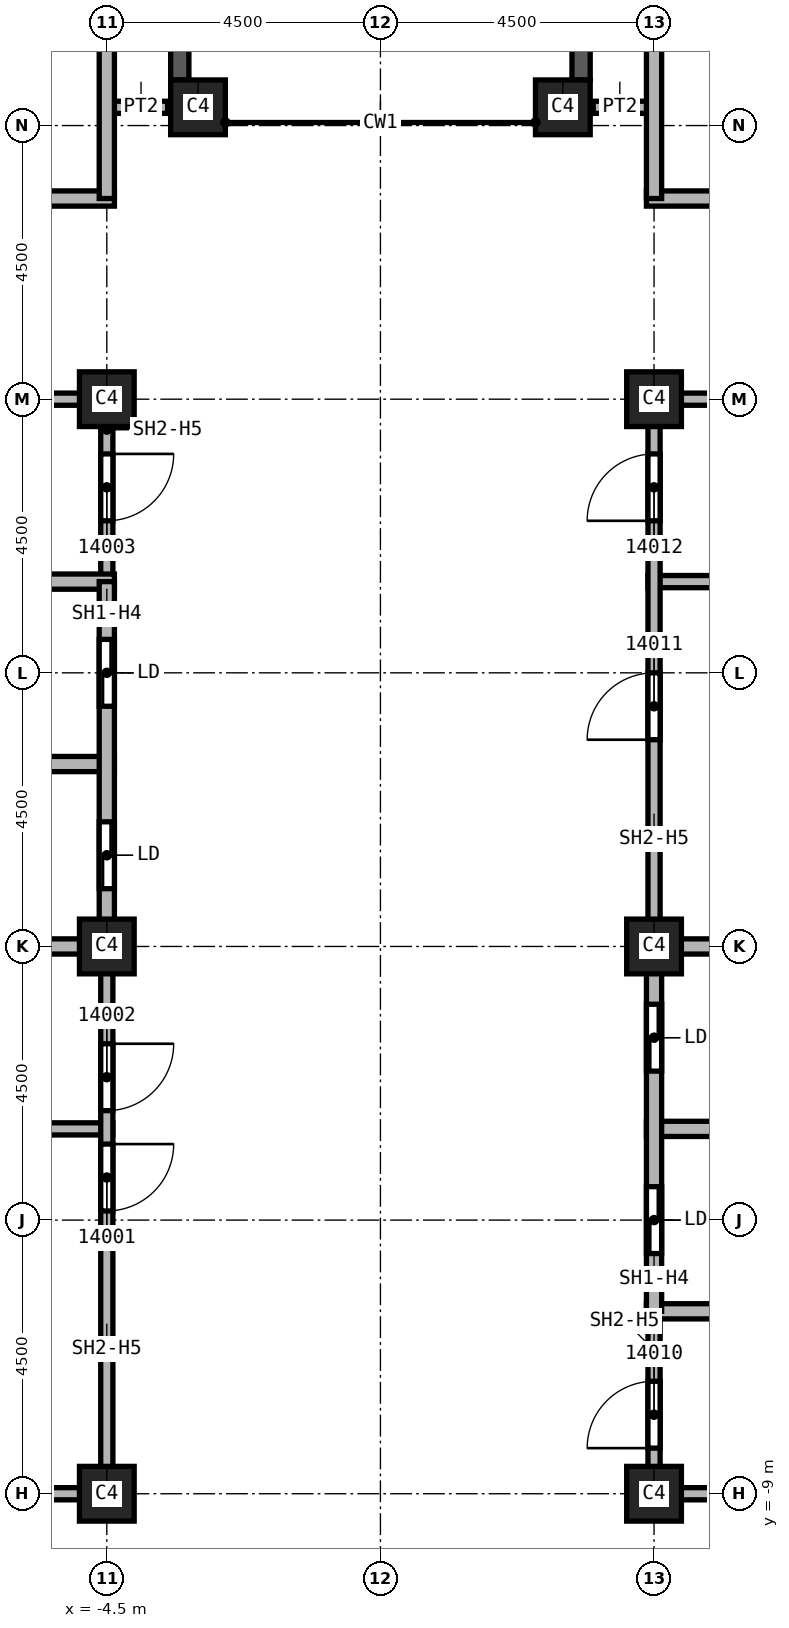
"""IFC4 building model, lengths in metres.
Left out: names, types, materials, properties, quantities, classifications, styles, units other than length and angle.
Written with IfcOpenShell. Run it as: python <this file> out.ifc"""

import sys

from ifc_helpers import new_model, si_unit, direction, frame, frame_2d, origin, origin_2d, place, context, subcontext, project, spatial, rectangle, extrude, element, fill, save


model = new_model("IFC4")
c1 = context("Model", 3, precision=1e-05, world=origin(), true_north=direction((0.0, 1.0)))
c2 = subcontext(c1, "Body", "Model", "MODEL_VIEW")
j1 = project(units=[si_unit("LENGTHUNIT", "METRE"), si_unit("PLANEANGLEUNIT", "RADIAN")], contexts=[c1])
p1 = place(None, origin())
s1 = spatial("IfcSite", under=j1, at=p1, CompositionType="ELEMENT")
p2 = place(p1, origin())
s2 = spatial("IfcBuilding", under=s1, at=p2, CompositionType="ELEMENT")
p3 = place(p2, frame((0.0, 0.0, 220.0)))
s3 = spatial("IfcBuildingStorey", under=s2, at=p3, CompositionType="ELEMENT", Elevation=220.0)
for number, where, z_axis, x_axis in (
    (1, (4.5, 0.0, 0.0), (0.0, 0.0, 1.0), (1.0, 0.0, 0.0)),
    (2, (4.5, 9.0, 0.0), (0.0, 0.0, 1.0), (1.0, 0.0, 0.0)),
    (3, (4.5, -9.0, 0.0), (0.0, 0.0, 1.0), (1.0, 0.0, 0.0)),
    (4, (-4.5, 0.0, 0.0), (0.0, 0.0, 1.0), (1.0, 0.0, 0.0)),
    (5, (-4.5, 9.0, 0.0), (0.0, 0.0, 1.0), (1.0, 0.0, 0.0)),
    (6, (-4.5, -9.0, 0.0), (0.0, 0.0, 1.0), (1.0, 0.0, 0.0)),
    (7, (3.0, 13.8, 0.0), (0.0, 0.0, 1.0), (1.0, 0.0, 0.0)),
    (8, (-3.0, 13.8, 0.0), (0.0, 0.0, 1.0), (1.0, 0.0, 0.0)),
):
    element("IfcColumn", number, at=place(p3, frame(where, z_axis=z_axis, x_axis=x_axis)), inside=s3, PredefinedType="COLUMN", context=c2, shape_type="SweptSolid", body=[
        extrude(rectangle(XDim=0.9, YDim=0.9, at=origin_2d()), origin(), (0.0, 0.0, 1.0), 3.72),
    ])
p4 = place(p3, frame((3.3, 22.3, 0.0), z_axis=(0.0, 0.0, 1.0), x_axis=(0.0, -1.0, 0.0)))
e9 = element("IfcWall", 9, at=p4, inside=s3, PredefinedType="SOLIDWALL", context=c2, shape_type="SweptSolid", body=[
    extrude(rectangle(XDim=8.05, YDim=0.3, at=frame_2d((4.025, 0.0))), origin(), (0.0, 0.0, 1.0), 3.12),
])
p5 = place(p4, frame((0.812, 0.0, 0.8)))
e10 = element("IfcOpeningElement", 10, at=p5, cuts=e9, PredefinedType="OPENING", context=c2, shape_type="SweptSolid", body=[
    extrude(rectangle(XDim=2.4, YDim=1.95, at=frame_2d((1.2, 0.975))), frame((0.0, 0.15, 0.0), z_axis=(0.0, -1.0, 0.0), x_axis=(1.0, 0.0, 0.0)), (0.0, 0.0, 1.0), 0.3),
])
p6 = place(p4, frame((4.837, 0.0, 0.8)))
e11 = element("IfcOpeningElement", 11, at=p6, cuts=e9, PredefinedType="OPENING", context=c2, shape_type="SweptSolid", body=[
    extrude(rectangle(XDim=2.4, YDim=1.95, at=frame_2d((1.2, 0.975))), frame((0.0, 0.15, 0.0), z_axis=(0.0, -1.0, 0.0), x_axis=(1.0, 0.0, 0.0)), (0.0, 0.0, 1.0), 0.3),
])
p7 = place(p3, frame((-3.3, 14.25, 0.0), z_axis=(0.0, 0.0, 1.0), x_axis=(0.0, 1.0, 0.0)))
e12 = element("IfcWall", 12, at=p7, inside=s3, PredefinedType="SOLIDWALL", context=c2, shape_type="SweptSolid", body=[
    extrude(rectangle(XDim=8.05, YDim=0.3, at=frame_2d((4.025, 0.0))), origin(), (0.0, 0.0, 1.0), 3.12),
])
p8 = place(p7, frame((0.812, 0.0, 0.8)))
e13 = element("IfcOpeningElement", 13, at=p8, cuts=e12, PredefinedType="OPENING", context=c2, shape_type="SweptSolid", body=[
    extrude(rectangle(XDim=2.4, YDim=1.95, at=frame_2d((1.2, 0.975))), frame((0.0, 0.15, 0.0), z_axis=(0.0, -1.0, 0.0), x_axis=(1.0, 0.0, 0.0)), (0.0, 0.0, 1.0), 0.3),
])
p9 = place(p7, frame((4.837, 0.0, 0.8)))
e14 = element("IfcOpeningElement", 14, at=p9, cuts=e12, PredefinedType="OPENING", context=c2, shape_type="SweptSolid", body=[
    extrude(rectangle(XDim=2.4, YDim=1.95, at=frame_2d((1.2, 0.975))), frame((0.0, 0.15, 0.0), z_axis=(0.0, -1.0, 0.0), x_axis=(1.0, 0.0, 0.0)), (0.0, 0.0, 1.0), 0.3),
])
for number, where, z_axis, x_axis in (
    (15, (-4.5, 13.8, 0.0), (0.0, 0.0, 1.0), (1.0, 0.0, 0.0)),
    (16, (3.5, 13.8, 0.0), (0.0, 0.0, 1.0), (1.0, 0.0, 0.0)),
):
    element("IfcWall", number, at=place(p3, frame(where, z_axis=z_axis, x_axis=x_axis)), inside=s3, PredefinedType="PARTITIONING", context=c2, shape_type="SweptSolid", body=[
        extrude(rectangle(XDim=1.0, YDim=0.2, at=frame_2d((0.5, 0.0))), origin(), (0.0, 0.0, 1.0), 3.72),
    ])
p10 = place(p3, frame((-7.625, -3.0, 0.0), z_axis=(0.0, 0.0, 1.0), x_axis=(1.0, 0.0, 0.0)))
e17 = element("IfcWall", 17, at=p10, inside=s3, PredefinedType="SOLIDWALL", context=c2, shape_type="SweptSolid", body=[
    extrude(rectangle(XDim=3.225, YDim=0.2, at=frame_2d((1.613, 0.0))), origin(), (0.0, 0.0, 1.0), 3.72),
])
for number, where, z_axis, x_axis in (
    (18, (-7.5, 9.0, 0.0), (0.0, 0.0, 1.0), (1.0, 0.0, 0.0)),
    (19, (-4.5, -9.0, 0.0), (0.0, 0.0, 1.0), (-1.0, 0.0, 0.0)),
):
    element("IfcWall", number, at=place(p3, frame(where, z_axis=z_axis, x_axis=x_axis)), inside=s3, PredefinedType="SOLIDWALL", context=c2, shape_type="SweptSolid", body=[
        extrude(rectangle(XDim=3.0, YDim=0.2, at=frame_2d((1.5, 0.0))), origin(), (0.0, 0.0, 1.0), 2.958),
    ])
p11 = place(p3, frame((-4.5, 0.0, 0.0), z_axis=(0.0, 0.0, 1.0), x_axis=(0.0, -1.0, 0.0)))
e20 = element("IfcWall", 20, at=p11, inside=s3, PredefinedType="SOLIDWALL", context=c2, shape_type="SweptSolid", body=[
    extrude(rectangle(XDim=9.1, YDim=0.2, at=frame_2d((4.55, 0.0))), origin(), (0.0, 0.0, 1.0), 2.958),
])
p12 = place(p11, frame((3.25, 0.0, 0.0)))
e21 = element("IfcOpeningElement", 21, at=p12, cuts=e20, PredefinedType="OPENING", context=c2, shape_type="SweptSolid", body=[
    extrude(rectangle(XDim=1.1, YDim=2.1, at=frame_2d((0.55, 1.05))), frame((0.0, 0.1, 0.0), z_axis=(0.0, -1.0, 0.0), x_axis=(1.0, 0.0, 0.0)), (0.0, 0.0, 1.0), 0.2),
])
p13 = place(p11, frame((1.6, 0.0, 0.0)))
e22 = element("IfcOpeningElement", 22, at=p13, cuts=e20, PredefinedType="OPENING", context=c2, shape_type="SweptSolid", body=[
    extrude(rectangle(XDim=1.1, YDim=2.1, at=frame_2d((0.55, 1.05))), frame((0.0, 0.1, 0.0), z_axis=(0.0, -1.0, 0.0), x_axis=(1.0, 0.0, 0.0)), (0.0, 0.0, 1.0), 0.2),
])
p14 = place(p3, frame((-4.5, 9.1, 0.0), z_axis=(0.0, 0.0, 1.0), x_axis=(0.0, -1.0, 0.0)))
e23 = element("IfcWall", 23, at=p14, inside=s3, PredefinedType="SOLIDWALL", context=c2, shape_type="SweptSolid", body=[
    extrude(rectangle(XDim=3.1, YDim=0.2, at=frame_2d((1.55, 0.0))), origin(), (0.0, 0.0, 1.0), 2.958),
])
p15 = place(p14, frame((1.0, 0.0, 0.0)))
e24 = element("IfcOpeningElement", 24, at=p15, cuts=e23, PredefinedType="OPENING", context=c2, shape_type="SweptSolid", body=[
    extrude(rectangle(XDim=1.1, YDim=2.1, at=frame_2d((0.55, 1.05))), frame((0.0, 0.1, 0.0), z_axis=(0.0, -1.0, 0.0), x_axis=(1.0, 0.0, 0.0)), (0.0, 0.0, 1.0), 0.2),
])
p16 = place(p3, frame((4.4, 6.0, 0.0), z_axis=(0.0, 0.0, 1.0), x_axis=(1.0, 0.0, 0.0)))
e25 = element("IfcWall", 25, at=p16, inside=s3, PredefinedType="SOLIDWALL", context=c2, shape_type="SweptSolid", body=[
    extrude(rectangle(XDim=3.2, YDim=0.2, at=frame_2d((1.6, 0.0))), origin(), (0.0, 0.0, 1.0), 3.72),
])
p17 = place(p3, frame((4.5, -9.1, 0.0), z_axis=(0.0, 0.0, 1.0), x_axis=(0.0, 1.0, 0.0)))
e26 = element("IfcWall", 26, at=p17, inside=s3, PredefinedType="SOLIDWALL", context=c2, shape_type="SweptSolid", body=[
    extrude(rectangle(XDim=3.1, YDim=0.2, at=frame_2d((1.55, 0.0))), origin(), (0.0, 0.0, 1.0), 2.958),
])
p18 = place(p17, frame((0.85, 0.0, 0.0)))
e27 = element("IfcOpeningElement", 27, at=p18, cuts=e26, PredefinedType="OPENING", context=c2, shape_type="SweptSolid", body=[
    extrude(rectangle(XDim=1.1, YDim=2.1, at=frame_2d((0.55, 1.05))), frame((0.0, 0.1, 0.0), z_axis=(0.0, -1.0, 0.0), x_axis=(1.0, 0.0, 0.0)), (0.0, 0.0, 1.0), 0.2),
])
p19 = place(p3, frame((4.5, 0.0, 0.0), z_axis=(0.0, 0.0, 1.0), x_axis=(0.0, 1.0, 0.0)))
e28 = element("IfcWall", 28, at=p19, inside=s3, PredefinedType="SOLIDWALL", context=c2, shape_type="SweptSolid", body=[
    extrude(rectangle(XDim=9.1, YDim=0.2, at=frame_2d((4.55, 0.0))), origin(), (0.0, 0.0, 1.0), 2.958),
])
p20 = place(p19, frame((3.4, 0.0, 0.0)))
e29 = element("IfcOpeningElement", 29, at=p20, cuts=e28, PredefinedType="OPENING", context=c2, shape_type="SweptSolid", body=[
    extrude(rectangle(XDim=1.1, YDim=2.1, at=frame_2d((0.55, 1.05))), frame((0.0, 0.1, 0.0), z_axis=(0.0, -1.0, 0.0), x_axis=(1.0, 0.0, 0.0)), (0.0, 0.0, 1.0), 0.2),
])
p21 = place(p19, frame((7.0, 0.0, 0.0)))
e30 = element("IfcOpeningElement", 30, at=p21, cuts=e28, PredefinedType="OPENING", context=c2, shape_type="SweptSolid", body=[
    extrude(rectangle(XDim=1.1, YDim=2.1, at=frame_2d((0.55, 1.05))), frame((0.0, 0.1, 0.0), z_axis=(0.0, -1.0, 0.0), x_axis=(1.0, 0.0, 0.0)), (0.0, 0.0, 1.0), 0.2),
])
for number, where, z_axis, x_axis in (
    (31, (4.5, 9.0, 0.0), (0.0, 0.0, 1.0), (1.0, 0.0, 0.0)),
    (32, (7.5, -9.0, 0.0), (0.0, 0.0, 1.0), (-1.0, 0.0, 0.0)),
):
    element("IfcWall", number, at=place(p3, frame(where, z_axis=z_axis, x_axis=x_axis)), inside=s3, PredefinedType="SOLIDWALL", context=c2, shape_type="SweptSolid", body=[
        extrude(rectangle(XDim=3.0, YDim=0.2, at=frame_2d((1.5, 0.0))), origin(), (0.0, 0.0, 1.0), 2.958),
    ])
p22 = place(p3, frame((-13.625, 3.0, 0.0), z_axis=(0.0, 0.0, 1.0), x_axis=(1.0, 0.0, 0.0)))
e33 = element("IfcWall", 33, at=p22, inside=s3, PredefinedType="SOLIDWALL", context=c2, shape_type="SweptSolid", body=[
    extrude(rectangle(XDim=9.25, YDim=0.25, at=frame_2d((4.625, 0.0))), origin(), (0.0, 0.0, 1.0), 3.72),
])
p23 = place(p22, frame((3.25, 0.0, 0.0)))
e34 = element("IfcOpeningElement", 34, at=p23, cuts=e33, PredefinedType="OPENING", context=c2, shape_type="SweptSolid", body=[
    extrude(rectangle(XDim=1.1, YDim=2.1, at=frame_2d((0.55, 1.05))), frame((0.0, 0.125, 0.0), z_axis=(0.0, -1.0, 0.0), x_axis=(1.0, 0.0, 0.0)), (0.0, 0.0, 1.0), 0.25),
])
for number, where, z_axis, x_axis in (
    (35, (-7.625, 0.0, 0.0), (0.0, 0.0, 1.0), (1.0, 0.0, 0.0)),
    (36, (-7.625, 6.0, 0.0), (0.0, 0.0, 1.0), (1.0, 0.0, 0.0)),
):
    element("IfcWall", number, at=place(p3, frame(where, z_axis=z_axis, x_axis=x_axis)), inside=s3, PredefinedType="SOLIDWALL", context=c2, shape_type="SweptSolid", body=[
        extrude(rectangle(XDim=3.25, YDim=0.25, at=frame_2d((1.625, 0.0))), origin(), (0.0, 0.0, 1.0), 3.72),
    ])
p24 = place(p3, frame((-4.5, 6.0, 0.0), z_axis=(0.0, 0.0, 1.0), x_axis=(0.0, -1.0, 0.0)))
e37 = element("IfcWall", 37, at=p24, inside=s3, PredefinedType="SOLIDWALL", context=c2, shape_type="SweptSolid", body=[
    extrude(rectangle(XDim=6.0, YDim=0.25, at=frame_2d((3.0, 0.0))), origin(), (0.0, 0.0, 1.0), 2.958),
])
p25 = place(p24, frame((3.95, 0.0, 0.0)))
e38 = element("IfcOpeningElement", 38, at=p25, cuts=e37, PredefinedType="OPENING", context=c2, shape_type="SweptSolid", body=[
    extrude(rectangle(XDim=1.1, YDim=2.1, at=frame_2d((0.55, 1.05))), frame((0.0, 0.125, 0.0), z_axis=(0.0, -1.0, 0.0), x_axis=(1.0, 0.0, 0.0)), (0.0, 0.0, 1.0), 0.25),
])
p26 = place(p24, frame((0.95, 0.0, 0.0)))
e39 = element("IfcOpeningElement", 39, at=p26, cuts=e37, PredefinedType="OPENING", context=c2, shape_type="SweptSolid", body=[
    extrude(rectangle(XDim=1.1, YDim=2.1, at=frame_2d((0.55, 1.05))), frame((0.0, 0.125, 0.0), z_axis=(0.0, -1.0, 0.0), x_axis=(1.0, 0.0, 0.0)), (0.0, 0.0, 1.0), 0.25),
])
p27 = place(p3, frame((4.375, -6.0, 0.0), z_axis=(0.0, 0.0, 1.0), x_axis=(1.0, 0.0, 0.0)))
e40 = element("IfcWall", 40, at=p27, inside=s3, PredefinedType="SOLIDWALL", context=c2, shape_type="SweptSolid", body=[
    extrude(rectangle(XDim=3.25, YDim=0.25, at=frame_2d((1.625, 0.0))), origin(), (0.0, 0.0, 1.0), 3.72),
])
p28 = place(p3, frame((4.375, -3.0, 0.0), z_axis=(0.0, 0.0, 1.0), x_axis=(1.0, 0.0, 0.0)))
e41 = element("IfcWall", 41, at=p28, inside=s3, PredefinedType="SOLIDWALL", context=c2, shape_type="SweptSolid", body=[
    extrude(rectangle(XDim=9.25, YDim=0.25, at=frame_2d((4.625, 0.0))), origin(), (0.0, 0.0, 1.0), 3.72),
])
p29 = place(p28, frame((3.375, 0.0, 0.0)))
e42 = element("IfcOpeningElement", 42, at=p29, cuts=e41, PredefinedType="OPENING", context=c2, shape_type="SweptSolid", body=[
    extrude(rectangle(XDim=1.1, YDim=2.1, at=frame_2d((0.55, 1.05))), frame((0.0, 0.125, 0.0), z_axis=(0.0, -1.0, 0.0), x_axis=(1.0, 0.0, 0.0)), (0.0, 0.0, 1.0), 0.25),
])
p30 = place(p3, frame((4.375, 0.0, 0.0), z_axis=(0.0, 0.0, 1.0), x_axis=(1.0, 0.0, 0.0)))
e43 = element("IfcWall", 43, at=p30, inside=s3, PredefinedType="SOLIDWALL", context=c2, shape_type="SweptSolid", body=[
    extrude(rectangle(XDim=3.25, YDim=0.25, at=frame_2d((1.625, 0.0))), origin(), (0.0, 0.0, 1.0), 3.72),
])
p31 = place(p3, frame((4.5, -6.0, 0.0), z_axis=(0.0, 0.0, 1.0), x_axis=(0.0, 1.0, 0.0)))
e44 = element("IfcWall", 44, at=p31, inside=s3, PredefinedType="SOLIDWALL", context=c2, shape_type="SweptSolid", body=[
    extrude(rectangle(XDim=6.0, YDim=0.25, at=frame_2d((3.0, 0.0))), origin(), (0.0, 0.0, 1.0), 2.958),
])
p32 = place(p31, frame((0.95, 0.0, 0.0)))
e45 = element("IfcOpeningElement", 45, at=p32, cuts=e44, PredefinedType="OPENING", context=c2, shape_type="SweptSolid", body=[
    extrude(rectangle(XDim=1.1, YDim=2.1, at=frame_2d((0.55, 1.05))), frame((0.0, 0.125, 0.0), z_axis=(0.0, -1.0, 0.0), x_axis=(1.0, 0.0, 0.0)), (0.0, 0.0, 1.0), 0.25),
])
p33 = place(p31, frame((3.95, 0.0, 0.0)))
e46 = element("IfcOpeningElement", 46, at=p33, cuts=e44, PredefinedType="OPENING", context=c2, shape_type="SweptSolid", body=[
    extrude(rectangle(XDim=1.1, YDim=2.1, at=frame_2d((0.55, 1.05))), frame((0.0, 0.125, 0.0), z_axis=(0.0, -1.0, 0.0), x_axis=(1.0, 0.0, 0.0)), (0.0, 0.0, 1.0), 0.25),
])
p34 = place(p3, frame((-13.625, 12.3, 0.0), z_axis=(0.0, 0.0, 1.0), x_axis=(1.0, 0.0, 0.0)))
e47 = element("IfcWall", 47, at=p34, inside=s3, PredefinedType="SOLIDWALL", context=c2, shape_type="SweptSolid", body=[
    extrude(rectangle(XDim=9.25, YDim=0.25, at=frame_2d((4.625, 0.0))), origin(), (0.0, 0.0, 1.0), 3.72),
])
p35 = place(p34, frame((0.85, 0.0, 0.0)))
e48 = element("IfcOpeningElement", 48, at=p35, cuts=e47, PredefinedType="OPENING", context=c2, shape_type="SweptSolid", body=[
    extrude(rectangle(XDim=1.2, YDim=2.1, at=frame_2d((0.6, 1.05))), frame((0.0, 0.125, 0.0), z_axis=(0.0, -1.0, 0.0), x_axis=(1.0, 0.0, 0.0)), (0.0, 0.0, 1.0), 0.25),
])
p36 = place(p3, frame((-4.5, 16.8, 0.0), z_axis=(0.0, 0.0, 1.0), x_axis=(0.0, -1.0, 0.0)))
e49 = element("IfcWall", 49, at=p36, inside=s3, PredefinedType="SOLIDWALL", context=c2, shape_type="SweptSolid", body=[
    extrude(rectangle(XDim=4.5, YDim=0.25, at=frame_2d((2.25, 0.0))), origin(), (0.0, 0.0, 1.0), 3.72),
])
p37 = place(p3, frame((4.375, 12.3, 0.0), z_axis=(0.0, 0.0, 1.0), x_axis=(1.0, 0.0, 0.0)))
e50 = element("IfcWall", 50, at=p37, inside=s3, PredefinedType="SOLIDWALL", context=c2, shape_type="SweptSolid", body=[
    extrude(rectangle(XDim=9.25, YDim=0.25, at=frame_2d((4.625, 0.0))), origin(), (0.0, 0.0, 1.0), 3.72),
])
p38 = place(p37, frame((7.2, 0.0, 0.0)))
e51 = element("IfcOpeningElement", 51, at=p38, cuts=e50, PredefinedType="OPENING", context=c2, shape_type="SweptSolid", body=[
    extrude(rectangle(XDim=1.2, YDim=2.1, at=frame_2d((0.6, 1.05))), frame((0.0, 0.125, 0.0), z_axis=(0.0, -1.0, 0.0), x_axis=(1.0, 0.0, 0.0)), (0.0, 0.0, 1.0), 0.25),
])
p39 = place(p3, frame((4.5, 12.3, 0.0), z_axis=(0.0, 0.0, 1.0), x_axis=(0.0, 1.0, 0.0)))
e52 = element("IfcWall", 52, at=p39, inside=s3, PredefinedType="SOLIDWALL", context=c2, shape_type="SweptSolid", body=[
    extrude(rectangle(XDim=4.5, YDim=0.25, at=frame_2d((2.25, 0.0))), origin(), (0.0, 0.0, 1.0), 3.72),
])
p40 = place(p12, origin())
e53 = element("IfcDoor", 53, at=p40, inside=s3, OperationType="SINGLE_SWING_RIGHT", PredefinedType="DOOR", context=c2, shape_type="SweptSolid", body=[
    extrude(rectangle(XDim=1.1, YDim=2.1, at=frame_2d((0.55, 1.05))), frame((0.0, 0.025, 0.0), z_axis=(0.0, -1.0, 0.0), x_axis=(1.0, 0.0, 0.0)), (0.0, 0.0, 1.0), 0.05),
])
fill(e21, e53)
p41 = place(p13, origin())
e54 = element("IfcDoor", 54, at=p41, inside=s3, OperationType="SINGLE_SWING_LEFT", PredefinedType="DOOR", context=c2, shape_type="SweptSolid", body=[
    extrude(rectangle(XDim=1.1, YDim=2.1, at=frame_2d((0.55, 1.05))), frame((0.0, 0.025, 0.0), z_axis=(0.0, -1.0, 0.0), x_axis=(1.0, 0.0, 0.0)), (0.0, 0.0, 1.0), 0.05),
])
fill(e22, e54)
p42 = place(p15, origin())
e55 = element("IfcDoor", 55, at=p42, inside=s3, OperationType="SINGLE_SWING_RIGHT", PredefinedType="DOOR", context=c2, shape_type="SweptSolid", body=[
    extrude(rectangle(XDim=1.1, YDim=2.1, at=frame_2d((0.55, 1.05))), frame((0.0, 0.025, 0.0), z_axis=(0.0, -1.0, 0.0), x_axis=(1.0, 0.0, 0.0)), (0.0, 0.0, 1.0), 0.05),
])
fill(e24, e55)
p43 = place(p18, origin())
e56 = element("IfcDoor", 56, at=p43, inside=s3, OperationType="SINGLE_SWING_LEFT", PredefinedType="DOOR", context=c2, shape_type="SweptSolid", body=[
    extrude(rectangle(XDim=1.1, YDim=2.1, at=frame_2d((0.55, 1.05))), frame((0.0, 0.025, 0.0), z_axis=(0.0, -1.0, 0.0), x_axis=(1.0, 0.0, 0.0)), (0.0, 0.0, 1.0), 0.05),
])
fill(e27, e56)
p44 = place(p20, origin())
e57 = element("IfcDoor", 57, at=p44, inside=s3, OperationType="SINGLE_SWING_RIGHT", PredefinedType="DOOR", context=c2, shape_type="SweptSolid", body=[
    extrude(rectangle(XDim=1.1, YDim=2.1, at=frame_2d((0.55, 1.05))), frame((0.0, 0.025, 0.0), z_axis=(0.0, -1.0, 0.0), x_axis=(1.0, 0.0, 0.0)), (0.0, 0.0, 1.0), 0.05),
])
fill(e29, e57)
p45 = place(p21, origin())
e58 = element("IfcDoor", 58, at=p45, inside=s3, OperationType="SINGLE_SWING_LEFT", PredefinedType="DOOR", context=c2, shape_type="SweptSolid", body=[
    extrude(rectangle(XDim=1.1, YDim=2.1, at=frame_2d((0.55, 1.05))), frame((0.0, 0.025, 0.0), z_axis=(0.0, -1.0, 0.0), x_axis=(1.0, 0.0, 0.0)), (0.0, 0.0, 1.0), 0.05),
])
fill(e30, e58)
p46 = place(p25, origin())
e59 = element("IfcDoor", 59, at=p46, inside=s3, OperationType="SLIDING_TO_LEFT", PredefinedType="DOOR", context=c2, shape_type="SweptSolid", body=[
    extrude(rectangle(XDim=1.1, YDim=2.1, at=frame_2d((0.55, 1.05))), frame((0.0, 0.025, 0.0), z_axis=(0.0, -1.0, 0.0), x_axis=(1.0, 0.0, 0.0)), (0.0, 0.0, 1.0), 0.05),
])
fill(e38, e59)
p47 = place(p26, origin())
e60 = element("IfcDoor", 60, at=p47, inside=s3, OperationType="SLIDING_TO_LEFT", PredefinedType="DOOR", context=c2, shape_type="SweptSolid", body=[
    extrude(rectangle(XDim=1.1, YDim=2.1, at=frame_2d((0.55, 1.05))), frame((0.0, 0.025, 0.0), z_axis=(0.0, -1.0, 0.0), x_axis=(1.0, 0.0, 0.0)), (0.0, 0.0, 1.0), 0.05),
])
fill(e39, e60)
p48 = place(p32, origin())
e61 = element("IfcDoor", 61, at=p48, inside=s3, OperationType="SLIDING_TO_LEFT", PredefinedType="DOOR", context=c2, shape_type="SweptSolid", body=[
    extrude(rectangle(XDim=1.1, YDim=2.1, at=frame_2d((0.55, 1.05))), frame((0.0, 0.025, 0.0), z_axis=(0.0, -1.0, 0.0), x_axis=(1.0, 0.0, 0.0)), (0.0, 0.0, 1.0), 0.05),
])
fill(e45, e61)
p49 = place(p33, origin())
e62 = element("IfcDoor", 62, at=p49, inside=s3, OperationType="SLIDING_TO_LEFT", PredefinedType="DOOR", context=c2, shape_type="SweptSolid", body=[
    extrude(rectangle(XDim=1.1, YDim=2.1, at=frame_2d((0.55, 1.05))), frame((0.0, 0.025, 0.0), z_axis=(0.0, -1.0, 0.0), x_axis=(1.0, 0.0, 0.0)), (0.0, 0.0, 1.0), 0.05),
])
fill(e46, e62)
save(model, sys.argv[1])
